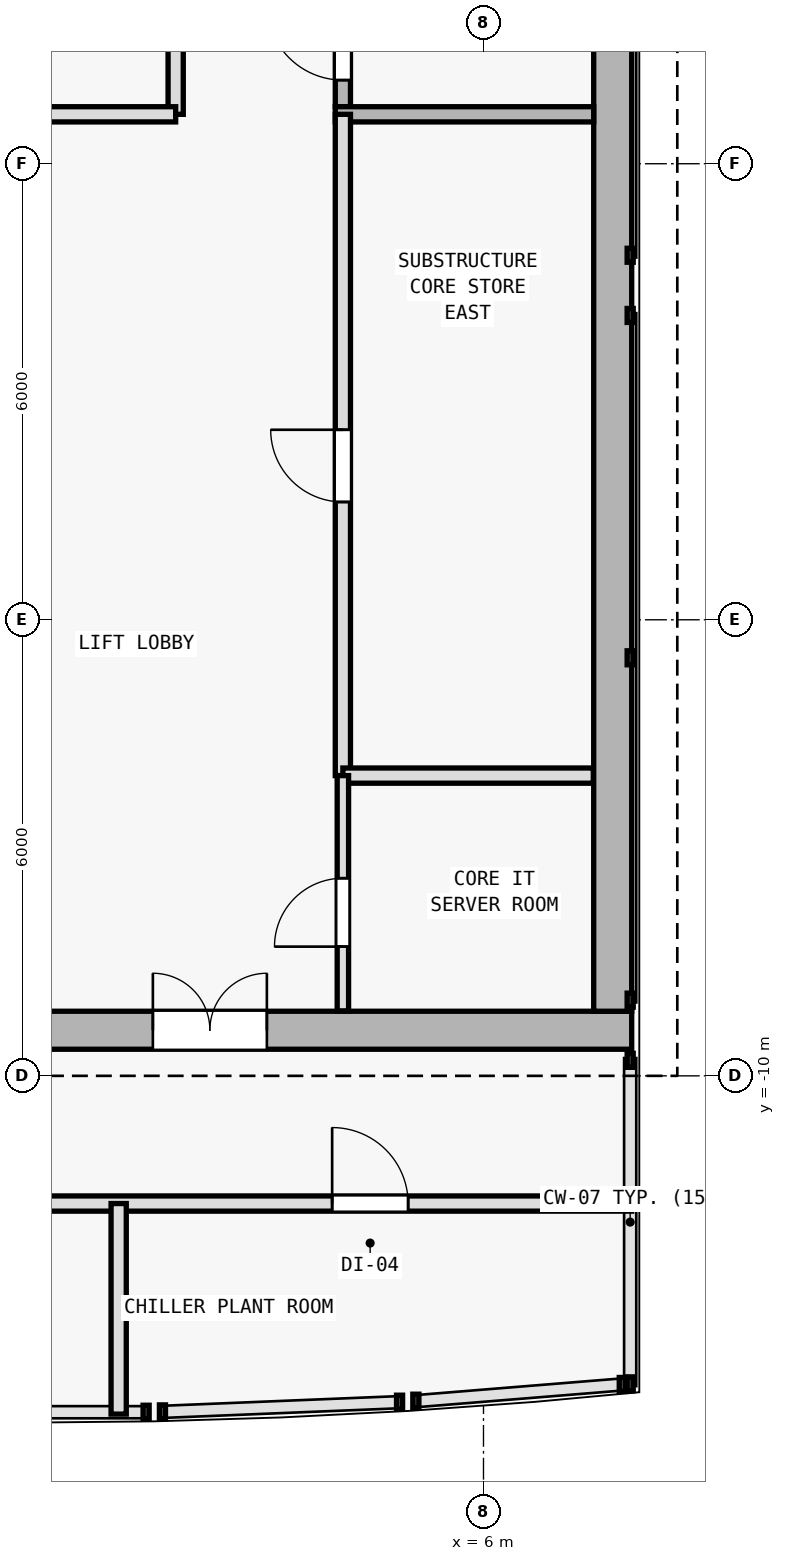
"""IFC4 building model, lengths in metres.
Left out: names, types, materials, properties, quantities, classifications, styles, units other than length and angle.
Written with IfcOpenShell. Run it as: python <this file> out.ifc"""

import sys

from ifc_helpers import new_model, si_unit, direction, frame, frame_2d, origin, origin_2d, place, context, subcontext, project, spatial, rectangle, i_section, extrude, element, fill, save


model = new_model("IFC4")
c1 = context("Model", 3, precision=1e-05, world=origin(), true_north=direction((0.0, 1.0)))
c2 = subcontext(c1, "Body", "Model", "MODEL_VIEW")
j1 = project(units=[si_unit("LENGTHUNIT", "METRE"), si_unit("PLANEANGLEUNIT", "RADIAN")], contexts=[c1])
p1 = place(None, origin())
s1 = spatial("IfcSite", under=j1, at=p1, CompositionType="ELEMENT")
p2 = place(p1, origin())
s2 = spatial("IfcBuilding", under=s1, at=p2, CompositionType="ELEMENT")
p3 = place(p2, frame((0.0, 0.0, 319.2)))
s3 = spatial("IfcBuildingStorey", under=s2, at=p3, CompositionType="ELEMENT", Elevation=319.2)
for number, where, z_axis, x_axis in (
    (1, (7.7, -9.4, 0.0), (0.0, 0.0, 1.0), (1.0, 0.0, 0.0)),
    (2, (7.7, 0.4, 0.0), (0.0, 0.0, 1.0), (1.0, 0.0, 0.0)),
):
    element("IfcColumn", number, at=place(p3, frame(where, z_axis=z_axis, x_axis=x_axis)), inside=s3, PredefinedType="COLUMN", context=c2, shape_type="SweptSolid", body=[
        extrude(i_section(OverallWidth=0.374, OverallDepth=0.372, WebThickness=0.012, FlangeThickness=0.02, FilletRadius=0.015, at=origin_2d()), origin(), (0.0, 0.0, 1.0), 3.6),
    ])
p4 = place(p3, frame((-7.95, -9.4, 0.0), z_axis=(0.0, 0.0, 1.0), x_axis=(1.0, 0.0, 0.0)))
e3 = element("IfcWall", 3, at=p4, inside=s3, PredefinedType="SHEAR", context=c2, shape_type="SweptSolid", body=[
    extrude(rectangle(XDim=15.9, YDim=0.5, at=frame_2d((7.95, 0.0))), origin(), (0.0, 0.0, 1.0), 2.4),
])
p5 = place(p4, frame((9.6, 0.0, 0.0)))
e4 = element("IfcOpeningElement", 4, at=p5, cuts=e3, PredefinedType="OPENING", context=c2, shape_type="SweptSolid", body=[
    extrude(rectangle(XDim=1.5, YDim=2.2, at=frame_2d((0.75, 1.1))), frame((0.0, 0.26, 0.0), z_axis=(0.0, -1.0, 0.0), x_axis=(1.0, 0.0, 0.0)), (0.0, 0.0, 1.0), 0.52),
])
p6 = place(p3, frame((7.7, 9.95, 0.0), z_axis=(0.0, 0.0, 1.0), x_axis=(0.0, -1.0, 0.0)))
e5 = element("IfcWall", 5, at=p6, inside=s3, PredefinedType="SHEAR", context=c2, shape_type="SweptSolid", body=[
    extrude(rectangle(XDim=19.1, YDim=0.5, at=frame_2d((9.55, 0.0))), origin(), (0.0, 0.0, 1.0), 2.4),
])
p7 = place(p3, frame((4.15, 2.75, 0.0), z_axis=(0.0, 0.0, 1.0), x_axis=(0.0, 1.0, 0.0)))
e6 = element("IfcWall", 6, at=p7, inside=s3, PredefinedType="SOLIDWALL", context=c2, shape_type="SweptSolid", body=[
    extrude(rectangle(XDim=7.2, YDim=0.2, at=frame_2d((3.6, 0.0))), origin(), (0.0, 0.0, 1.0), 2.4),
])
p8 = place(p7, frame((0.35, 0.0, 0.0)))
e7 = element("IfcOpeningElement", 7, at=p8, cuts=e6, PredefinedType="OPENING", context=c2, shape_type="SweptSolid", body=[
    extrude(rectangle(XDim=1.0, YDim=2.15, at=frame_2d((0.5, 1.075))), frame((0.0, 0.11, 0.0), z_axis=(0.0, -1.0, 0.0), x_axis=(1.0, 0.0, 0.0)), (0.0, 0.0, 1.0), 0.22),
])
p9 = place(p3, frame((4.05, 2.65, 0.0), z_axis=(0.0, 0.0, 1.0), x_axis=(1.0, 0.0, 0.0)))
e8 = element("IfcWall", 8, at=p9, inside=s3, PredefinedType="SOLIDWALL", context=c2, shape_type="SweptSolid", body=[
    extrude(rectangle(XDim=3.4, YDim=0.2, at=frame_2d((1.7, 0.0))), origin(), (0.0, 0.0, 1.0), 2.4),
])
p10 = place(p3, frame((4.15, -6.05, 0.0), z_axis=(0.0, 0.0, 1.0), x_axis=(0.0, 1.0, 0.0)))
e9 = element("IfcWall", 9, at=p10, inside=s3, PredefinedType="SOLIDWALL", context=c2, shape_type="SweptSolid", body=[
    extrude(rectangle(XDim=8.7, YDim=0.2, at=frame_2d((4.35, 0.0))), origin(), (0.0, 0.0, 1.0), 2.4),
])
p11 = place(p10, frame((3.6, 0.0, 0.0)))
e10 = element("IfcOpeningElement", 10, at=p11, cuts=e9, PredefinedType="OPENING", context=c2, shape_type="SweptSolid", body=[
    extrude(rectangle(XDim=0.95, YDim=2.1, at=frame_2d((0.475, 1.05))), frame((0.0, 0.11, 0.0), z_axis=(0.0, -1.0, 0.0), x_axis=(1.0, 0.0, 0.0)), (0.0, 0.0, 1.0), 0.22),
])
p12 = place(p3, frame((1.95, 2.65, 0.0), z_axis=(0.0, 0.0, 1.0), x_axis=(0.0, 1.0, 0.0)))
e11 = element("IfcWall", 11, at=p12, inside=s3, PredefinedType="SOLIDWALL", context=c2, shape_type="SweptSolid", body=[
    extrude(rectangle(XDim=7.295, YDim=0.2, at=frame_2d((3.647, 0.0))), origin(), (0.0, 0.0, 1.0), 2.4),
])
p13 = place(p12, frame((2.4, 0.0, 0.0)))
e12 = element("IfcOpeningElement", 12, at=p13, cuts=e11, PredefinedType="OPENING", context=c2, shape_type="SweptSolid", body=[
    extrude(rectangle(XDim=0.95, YDim=2.1, at=frame_2d((0.475, 1.05))), frame((0.0, 0.11, 0.0), z_axis=(0.0, -1.0, 0.0), x_axis=(1.0, 0.0, 0.0)), (0.0, 0.0, 1.0), 0.22),
])
p14 = place(p3, frame((-0.95, 2.65, 0.0), z_axis=(0.0, 0.0, 1.0), x_axis=(1.0, 0.0, 0.0)))
e13 = element("IfcWall", 13, at=p14, inside=s3, PredefinedType="SOLIDWALL", context=c2, shape_type="SweptSolid", body=[
    extrude(rectangle(XDim=2.9, YDim=0.2, at=frame_2d((1.45, 0.0))), origin(), (0.0, 0.0, 1.0), 2.4),
])
p15 = place(p3, frame((4.15, -6.05, 0.0), z_axis=(0.0, 0.0, 1.0), x_axis=(1.0, 0.0, 0.0)))
e14 = element("IfcWall", 14, at=p15, inside=s3, PredefinedType="SOLIDWALL", context=c2, shape_type="SweptSolid", body=[
    extrude(rectangle(XDim=3.295, YDim=0.2, at=frame_2d((1.647, 0.0))), origin(), (0.0, 0.0, 1.0), 2.4),
])
p16 = place(p3, frame((4.15, -9.145, 0.0), z_axis=(0.0, 0.0, 1.0), x_axis=(0.0, 1.0, 0.0)))
e15 = element("IfcWall", 15, at=p16, inside=s3, PredefinedType="PARTITIONING", context=c2, shape_type="SweptSolid", body=[
    extrude(rectangle(XDim=3.095, YDim=0.15, at=frame_2d((1.547, 0.0))), origin(), (0.0, 0.0, 1.0), 2.4),
])
p17 = place(p16, frame((0.845, 0.0, 0.0)))
e16 = element("IfcOpeningElement", 16, at=p17, cuts=e15, PredefinedType="OPENING", context=c2, shape_type="SweptSolid", body=[
    extrude(rectangle(XDim=0.9, YDim=2.1, at=frame_2d((0.45, 1.05))), frame((0.0, 0.085, 0.0), z_axis=(0.0, -1.0, 0.0), x_axis=(1.0, 0.0, 0.0)), (0.0, 0.0, 1.0), 0.17),
])
p18 = place(p3, frame((-10.18, -11.68, 0.0), z_axis=(0.0, 0.0, 1.0), x_axis=(1.0, 0.0, 0.0)))
e17 = element("IfcWall", 17, at=p18, inside=s3, PredefinedType="SOLIDWALL", context=c2, shape_type="SweptSolid", body=[
    extrude(rectangle(XDim=18.13, YDim=0.2, at=frame_2d((9.065, 0.0))), origin(), (0.0, 0.0, 1.0), 2.4),
])
p19 = place(p18, frame((5.436, 0.0, 0.0)))
e18 = element("IfcOpeningElement", 18, at=p19, cuts=e17, PredefinedType="OPENING", context=c2, shape_type="SweptSolid", body=[
    extrude(rectangle(XDim=1.0, YDim=2.15, at=frame_2d((0.5, 1.075))), frame((0.0, 0.11, 0.0), z_axis=(0.0, -1.0, 0.0), x_axis=(1.0, 0.0, 0.0)), (0.0, 0.0, 1.0), 0.22),
])
p20 = place(p18, frame((14.189, 0.0, 0.0)))
e19 = element("IfcOpeningElement", 19, at=p20, cuts=e17, PredefinedType="OPENING", context=c2, shape_type="SweptSolid", body=[
    extrude(rectangle(XDim=1.0, YDim=2.15, at=frame_2d((0.5, 1.075))), frame((0.0, 0.11, 0.0), z_axis=(0.0, -1.0, 0.0), x_axis=(1.0, 0.0, 0.0)), (0.0, 0.0, 1.0), 0.22),
])
p21 = place(p3, frame((1.2, -14.45, 0.0), z_axis=(0.0, 0.0, 1.0), x_axis=(0.0, 1.0, 0.0)))
e20 = element("IfcWall", 20, at=p21, inside=s3, PredefinedType="SOLIDWALL", context=c2, shape_type="SweptSolid", body=[
    extrude(rectangle(XDim=2.77, YDim=0.2, at=frame_2d((1.385, 0.0))), origin(), (0.0, 0.0, 1.0), 2.4),
])
p22 = place(p5, origin())
e21 = element("IfcDoor", 21, at=p22, inside=s3, OperationType="DOUBLE_DOOR_SINGLE_SWING", PredefinedType="DOOR", context=c2, shape_type="SweptSolid", body=[
    extrude(rectangle(XDim=1.5, YDim=2.2, at=frame_2d((0.75, 1.1))), frame((0.0, 0.025, 0.0), z_axis=(0.0, -1.0, 0.0), x_axis=(1.0, 0.0, 0.0)), (0.0, 0.0, 1.0), 0.05),
])
fill(e4, e21)
p23 = place(p8, origin())
e22 = element("IfcDoor", 22, at=p23, inside=s3, OperationType="SINGLE_SWING_RIGHT", PredefinedType="DOOR", context=c2, shape_type="SweptSolid", body=[
    extrude(rectangle(XDim=1.0, YDim=2.15, at=frame_2d((0.5, 1.075))), frame((0.0, 0.025, 0.0), z_axis=(0.0, -1.0, 0.0), x_axis=(1.0, 0.0, 0.0)), (0.0, 0.0, 1.0), 0.05),
])
fill(e7, e22)
p24 = place(p11, origin())
e23 = element("IfcDoor", 23, at=p24, inside=s3, OperationType="SINGLE_SWING_RIGHT", PredefinedType="DOOR", context=c2, shape_type="SweptSolid", body=[
    extrude(rectangle(XDim=0.95, YDim=2.1, at=frame_2d((0.475, 1.05))), frame((0.0, 0.025, 0.0), z_axis=(0.0, -1.0, 0.0), x_axis=(1.0, 0.0, 0.0)), (0.0, 0.0, 1.0), 0.05),
])
fill(e10, e23)
p25 = place(p17, origin())
e24 = element("IfcDoor", 24, at=p25, inside=s3, OperationType="SINGLE_SWING_LEFT", PredefinedType="DOOR", context=c2, shape_type="SweptSolid", body=[
    extrude(rectangle(XDim=0.9, YDim=2.1, at=frame_2d((0.45, 1.05))), frame((0.0, 0.025, 0.0), z_axis=(0.0, -1.0, 0.0), x_axis=(1.0, 0.0, 0.0)), (0.0, 0.0, 1.0), 0.05),
])
fill(e16, e24)
p26 = place(p20, origin())
e25 = element("IfcDoor", 25, at=p26, inside=s3, OperationType="SINGLE_SWING_LEFT", PredefinedType="DOOR", context=c2, shape_type="SweptSolid", body=[
    extrude(rectangle(XDim=1.0, YDim=2.15, at=frame_2d((0.5, 1.075))), frame((0.0, 0.025, 0.0), z_axis=(0.0, -1.0, 0.0), x_axis=(1.0, 0.0, 0.0)), (0.0, 0.0, 1.0), 0.05),
])
fill(e19, e25)
save(model, sys.argv[1])
